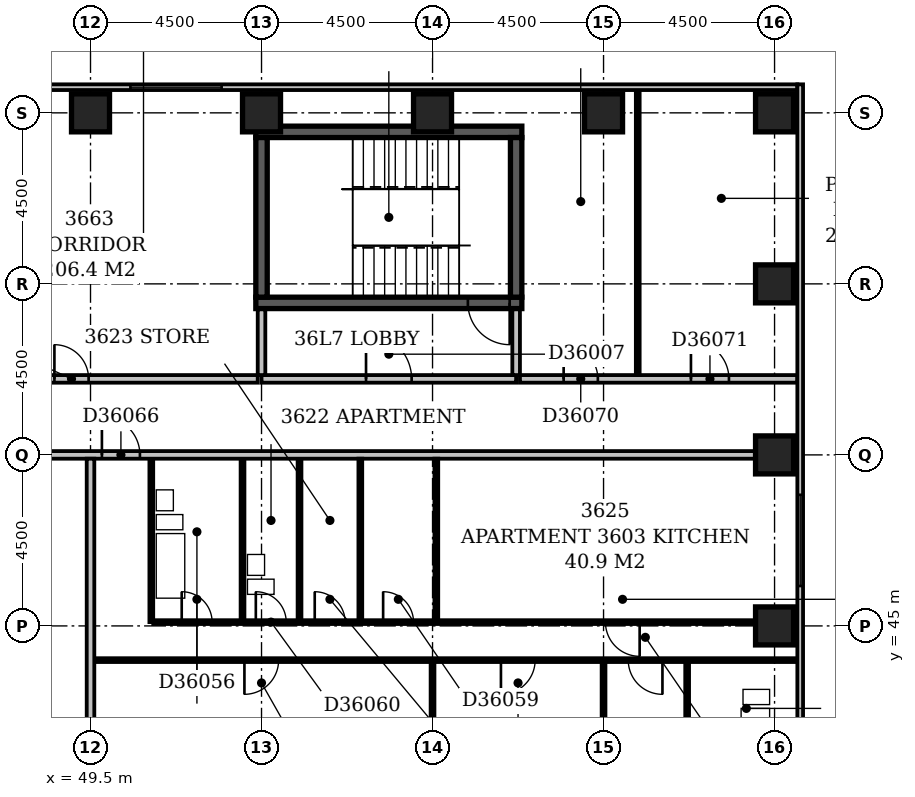
"""IFC4 building model, lengths in metres.
Left out: names, types, materials, properties, quantities, classifications, styles, units other than length and angle.
Written with IfcOpenShell. Run it as: python <this file> out.ifc"""

import sys

from ifc_helpers import new_model, si_unit, direction, frame, frame_2d, origin, origin_2d, place, context, subcontext, project, spatial, rectangle, extrude, element, fill, save


model = new_model("IFC4")
c1 = context("Model", 3, precision=1e-05, world=origin(), true_north=direction((0.0, 1.0)))
c2 = subcontext(c1, "Body", "Model", "MODEL_VIEW")
j1 = project(units=[si_unit("LENGTHUNIT", "METRE"), si_unit("PLANEANGLEUNIT", "RADIAN")], contexts=[c1])
p1 = place(None, origin())
s1 = spatial("IfcSite", under=j1, at=p1, CompositionType="ELEMENT")
p2 = place(p1, origin())
s2 = spatial("IfcBuilding", under=s1, at=p2, CompositionType="ELEMENT")
p3 = place(p2, frame((0.0, 0.0, 144.8)))
s3 = spatial("IfcBuildingStorey", under=s2, at=p3, CompositionType="ELEMENT", Elevation=144.8)
p4 = place(p3, frame((53.85, 53.5, -0.3), z_axis=(0.0, 0.0, 1.0), x_axis=(1.0, 0.0, 0.0)))
e1 = element("IfcWall", 1, at=p4, inside=s3, PredefinedType="SHEAR", context=c2, shape_type="SweptSolid", body=[
    extrude(rectangle(XDim=7.0, YDim=0.3, at=frame_2d((3.5, 0.0))), origin(), (0.0, 0.0, 1.0), 3.6),
])
p5 = place(p4, frame((5.58, 0.0, 0.3)))
e2 = element("IfcOpeningElement", 2, at=p5, cuts=e1, PredefinedType="OPENING", context=c2, shape_type="SweptSolid", body=[
    extrude(rectangle(XDim=1.1, YDim=2.1, at=frame_2d((0.55, 1.05))), frame((0.0, 0.162, 0.0), z_axis=(0.0, -1.0, 0.0), x_axis=(1.0, 0.0, 0.0)), (0.0, 0.0, 1.0), 0.324),
])
p6 = place(p3, frame((53.85, 58.0, -0.3), z_axis=(0.0, 0.0, 1.0), x_axis=(1.0, 0.0, 0.0)))
e3 = element("IfcWall", 3, at=p6, inside=s3, PredefinedType="SHEAR", context=c2, shape_type="SweptSolid", body=[
    extrude(rectangle(XDim=7.0, YDim=0.3, at=frame_2d((3.5, 0.0))), origin(), (0.0, 0.0, 1.0), 3.6),
])
for number, where, z_axis, x_axis in (
    (4, (54.0, 53.65, -0.3), (0.0, 0.0, 1.0), (0.0, 1.0, 0.0)),
    (5, (60.7, 53.65, -0.3), (0.0, 0.0, 1.0), (0.0, 1.0, 0.0)),
):
    element("IfcWall", number, at=place(p3, frame(where, z_axis=z_axis, x_axis=x_axis)), inside=s3, PredefinedType="SHEAR", context=c2, shape_type="SweptSolid", body=[
        extrude(rectangle(XDim=4.2, YDim=0.3, at=frame_2d((2.1, 0.0))), origin(), (0.0, 0.0, 1.0), 3.6),
    ])
for number, where, z_axis, x_axis in (
    (6, (67.5, 45.0, -0.3), (0.0, 0.0, 1.0), (1.0, 0.0, 0.0)),
    (7, (67.5, 49.5, -0.3), (0.0, 0.0, 1.0), (1.0, 0.0, 0.0)),
    (8, (67.5, 54.0, -0.3), (0.0, 0.0, 1.0), (1.0, 0.0, 0.0)),
    (9, (49.5, 58.5, -0.3), (0.0, 0.0, 1.0), (1.0, 0.0, 0.0)),
    (10, (54.0, 58.5, -0.3), (0.0, 0.0, 1.0), (1.0, 0.0, 0.0)),
    (11, (58.5, 58.5, -0.3), (0.0, 0.0, 1.0), (1.0, 0.0, 0.0)),
    (12, (63.0, 58.5, -0.3), (0.0, 0.0, 1.0), (1.0, 0.0, 0.0)),
    (13, (67.5, 58.5, -0.3), (0.0, 0.0, 1.0), (1.0, 0.0, 0.0)),
):
    element("IfcColumn", number, at=place(p3, frame(where, z_axis=z_axis, x_axis=x_axis)), inside=s3, PredefinedType="COLUMN", context=c2, shape_type="SweptSolid", body=[
        extrude(rectangle(XDim=1.0, YDim=1.0, at=origin_2d()), origin(), (0.0, 0.0, 1.0), 3.6),
    ])
p7 = place(p3, frame((68.175, 35.4, 0.0), z_axis=(0.0, 0.0, 1.0), x_axis=(0.0, 1.0, 0.0)))
e14 = element("IfcWall", 14, at=p7, inside=s3, PredefinedType="STANDARD", context=c2, shape_type="SweptSolid", body=[
    extrude(rectangle(XDim=23.85, YDim=0.15, at=frame_2d((11.925, 0.0))), origin(), (0.0, 0.0, 1.0), 2.7),
])
p8 = place(p7, frame((1.36, 0.0, 0.6)))
e15 = element("IfcOpeningElement", 15, at=p8, cuts=e14, PredefinedType="OPENING", context=c2, shape_type="SweptSolid", body=[
    extrude(rectangle(XDim=1.8, YDim=1.8, at=frame_2d((0.9, 0.9))), frame((0.0, 0.087, 0.0), z_axis=(0.0, -1.0, 0.0), x_axis=(1.0, 0.0, 0.0)), (0.0, 0.0, 1.0), 0.174),
])
p9 = place(p7, frame((10.65, 0.0, 0.6)))
e16 = element("IfcOpeningElement", 16, at=p9, cuts=e14, PredefinedType="OPENING", context=c2, shape_type="SweptSolid", body=[
    extrude(rectangle(XDim=2.4, YDim=1.8, at=frame_2d((1.2, 0.9))), frame((0.0, 0.087, 0.0), z_axis=(0.0, -1.0, 0.0), x_axis=(1.0, 0.0, 0.0)), (0.0, 0.0, 1.0), 0.174),
])
p10 = place(p3, frame((68.1, 59.175, 0.0), z_axis=(0.0, 0.0, 1.0), x_axis=(-1.0, 0.0, 0.0)))
e17 = element("IfcWall", 17, at=p10, inside=s3, PredefinedType="STANDARD", context=c2, shape_type="SweptSolid", body=[
    extrude(rectangle(XDim=68.85, YDim=0.15, at=frame_2d((34.425, 0.0))), origin(), (0.0, 0.0, 1.0), 2.7),
])
p11 = place(p10, frame((15.15, 0.0, 0.6)))
e18 = element("IfcOpeningElement", 18, at=p11, cuts=e17, PredefinedType="OPENING", context=c2, shape_type="SweptSolid", body=[
    extrude(rectangle(XDim=2.4, YDim=1.8, at=frame_2d((1.2, 0.9))), frame((0.0, 0.087, 0.0), z_axis=(0.0, -1.0, 0.0), x_axis=(1.0, 0.0, 0.0)), (0.0, 0.0, 1.0), 0.174),
])
p12 = place(p10, frame((19.65, 0.0, 0.6)))
e19 = element("IfcOpeningElement", 19, at=p12, cuts=e17, PredefinedType="OPENING", context=c2, shape_type="SweptSolid", body=[
    extrude(rectangle(XDim=2.4, YDim=1.8, at=frame_2d((1.2, 0.9))), frame((0.0, 0.087, 0.0), z_axis=(0.0, -1.0, 0.0), x_axis=(1.0, 0.0, 0.0)), (0.0, 0.0, 1.0), 0.174),
])
p13 = place(p10, frame((37.65, 0.0, 0.6)))
e20 = element("IfcOpeningElement", 20, at=p13, cuts=e17, PredefinedType="OPENING", context=c2, shape_type="SweptSolid", body=[
    extrude(rectangle(XDim=2.4, YDim=1.8, at=frame_2d((1.2, 0.9))), frame((0.0, 0.087, 0.0), z_axis=(0.0, -1.0, 0.0), x_axis=(1.0, 0.0, 0.0)), (0.0, 0.0, 1.0), 0.174),
])
p14 = place(p3, frame((54.0, 51.5, 0.0), z_axis=(0.0, 0.0, 1.0), x_axis=(1.0, 0.0, 0.0)))
e21 = element("IfcWall", 21, at=p14, inside=s3, PredefinedType="PARTITIONING", context=c2, shape_type="SweptSolid", body=[
    extrude(rectangle(XDim=6.7, YDim=0.2, at=frame_2d((3.35, 0.0))), origin(), (0.0, 0.0, 1.0), 3.3),
])
p15 = place(p14, frame((2.75, 0.0, 0.0)))
e22 = element("IfcOpeningElement", 22, at=p15, cuts=e21, PredefinedType="OPENING", context=c2, shape_type="SweptSolid", body=[
    extrude(rectangle(XDim=1.2, YDim=2.1, at=frame_2d((0.6, 1.05))), frame((0.0, 0.112, 0.0), z_axis=(0.0, -1.0, 0.0), x_axis=(1.0, 0.0, 0.0)), (0.0, 0.0, 1.0), 0.224),
])
p16 = place(p3, frame((60.7, 51.6, 0.0), z_axis=(0.0, 0.0, 1.0), x_axis=(0.0, 1.0, 0.0)))
e23 = element("IfcWall", 23, at=p16, inside=s3, PredefinedType="PARTITIONING", context=c2, shape_type="SweptSolid", body=[
    extrude(rectangle(XDim=1.73, YDim=0.2, at=frame_2d((0.865, 0.0))), origin(), (0.0, 0.0, 1.0), 3.3),
])
p17 = place(p3, frame((54.0, 51.6, 0.0), z_axis=(0.0, 0.0, 1.0), x_axis=(0.0, 1.0, 0.0)))
e24 = element("IfcWall", 24, at=p17, inside=s3, PredefinedType="PARTITIONING", context=c2, shape_type="SweptSolid", body=[
    extrude(rectangle(XDim=1.73, YDim=0.2, at=frame_2d((0.865, 0.0))), origin(), (0.0, 0.0, 1.0), 2.6),
])
p18 = place(p3, frame((49.5, 36.5, 0.0), z_axis=(0.0, 0.0, 1.0), x_axis=(0.0, 1.0, 0.0)))
e25 = element("IfcWall", 25, at=p18, inside=s3, PredefinedType="PARTITIONING", context=c2, shape_type="SweptSolid", body=[
    extrude(rectangle(XDim=12.9, YDim=0.2, at=frame_2d((6.45, 0.0))), origin(), (0.0, 0.0, 1.0), 3.3),
])
p19 = place(p3, frame((58.5, 36.5, 0.0), z_axis=(0.0, 0.0, 1.0), x_axis=(0.0, 1.0, 0.0)))
e26 = element("IfcWall", 26, at=p19, inside=s3, PredefinedType="PARTITIONING", context=c2, shape_type="SweptSolid", body=[
    extrude(rectangle(XDim=7.55, YDim=0.1, at=frame_2d((3.775, 0.0))), origin(), (0.0, 0.0, 1.0), 3.3),
])
p20 = place(p3, frame((63.0, 36.5, 0.0), z_axis=(0.0, 0.0, 1.0), x_axis=(0.0, 1.0, 0.0)))
e27 = element("IfcWall", 27, at=p20, inside=s3, PredefinedType="PARTITIONING", context=c2, shape_type="SweptSolid", body=[
    extrude(rectangle(XDim=7.55, YDim=0.1, at=frame_2d((3.775, 0.0))), origin(), (0.0, 0.0, 1.0), 2.4),
])
p21 = place(p3, frame((65.2, 40.7, 0.0), z_axis=(0.0, 0.0, 1.0), x_axis=(0.0, 1.0, 0.0)))
e28 = element("IfcWall", 28, at=p21, inside=s3, PredefinedType="PLUMBINGWALL", context=c2, shape_type="SweptSolid", body=[
    extrude(rectangle(XDim=3.35, YDim=0.1, at=frame_2d((1.675, 0.0))), origin(), (0.0, 0.0, 1.0), 3.3),
])
p22 = place(p21, frame((1.05, 0.0, 0.0)))
e29 = element("IfcOpeningElement", 29, at=p22, cuts=e28, PredefinedType="OPENING", context=c2, shape_type="SweptSolid", body=[
    extrude(rectangle(XDim=0.8, YDim=2.1, at=frame_2d((0.4, 1.05))), frame((0.0, 0.062, 0.0), z_axis=(0.0, -1.0, 0.0), x_axis=(1.0, 0.0, 0.0)), (0.0, 0.0, 1.0), 0.124),
])
p23 = place(p3, frame((49.6, 44.1, 0.0), z_axis=(0.0, 0.0, 1.0), x_axis=(1.0, 0.0, 0.0)))
e30 = element("IfcWall", 30, at=p23, inside=s3, PredefinedType="PARTITIONING", context=c2, shape_type="SweptSolid", body=[
    extrude(rectangle(XDim=18.5, YDim=0.1, at=frame_2d((9.25, 0.0))), origin(), (0.0, 0.0, 1.0), 3.3),
])
p24 = place(p23, frame((3.95, 0.0, 0.0)))
e31 = element("IfcOpeningElement", 31, at=p24, cuts=e30, PredefinedType="OPENING", context=c2, shape_type="SweptSolid", body=[
    extrude(rectangle(XDim=0.9, YDim=2.1, at=frame_2d((0.45, 1.05))), frame((0.0, 0.062, 0.0), z_axis=(0.0, -1.0, 0.0), x_axis=(1.0, 0.0, 0.0)), (0.0, 0.0, 1.0), 0.124),
])
p25 = place(p23, frame((10.7, 0.0, 0.0)))
e32 = element("IfcOpeningElement", 32, at=p25, cuts=e30, PredefinedType="OPENING", context=c2, shape_type="SweptSolid", body=[
    extrude(rectangle(XDim=0.9, YDim=2.1, at=frame_2d((0.45, 1.05))), frame((0.0, 0.062, 0.0), z_axis=(0.0, -1.0, 0.0), x_axis=(1.0, 0.0, 0.0)), (0.0, 0.0, 1.0), 0.124),
])
p26 = place(p23, frame((14.05, 0.0, 0.0)))
e33 = element("IfcOpeningElement", 33, at=p26, cuts=e30, PredefinedType="OPENING", context=c2, shape_type="SweptSolid", body=[
    extrude(rectangle(XDim=0.9, YDim=2.1, at=frame_2d((0.45, 1.05))), frame((0.0, 0.062, 0.0), z_axis=(0.0, -1.0, 0.0), x_axis=(1.0, 0.0, 0.0)), (0.0, 0.0, 1.0), 0.124),
])
p27 = place(p3, frame((51.1, 45.1, 0.0), z_axis=(0.0, 0.0, 1.0), x_axis=(0.0, 1.0, 0.0)))
e34 = element("IfcWall", 34, at=p27, inside=s3, PredefinedType="PLUMBINGWALL", context=c2, shape_type="SweptSolid", body=[
    extrude(rectangle(XDim=4.3, YDim=0.1, at=frame_2d((2.15, 0.0))), origin(), (0.0, 0.0, 1.0), 3.3),
])
p28 = place(p3, frame((51.15, 45.1, 0.0), z_axis=(0.0, 0.0, 1.0), x_axis=(1.0, 0.0, 0.0)))
e35 = element("IfcWall", 35, at=p28, inside=s3, PredefinedType="PARTITIONING", context=c2, shape_type="SweptSolid", body=[
    extrude(rectangle(XDim=15.85, YDim=0.1, at=frame_2d((7.925, 0.0))), origin(), (0.0, 0.0, 1.0), 3.3),
])
p29 = place(p28, frame((0.75, 0.0, 0.0)))
e36 = element("IfcOpeningElement", 36, at=p29, cuts=e35, PredefinedType="OPENING", context=c2, shape_type="SweptSolid", body=[
    extrude(rectangle(XDim=0.8, YDim=2.1, at=frame_2d((0.4, 1.05))), frame((0.0, 0.062, 0.0), z_axis=(0.0, -1.0, 0.0), x_axis=(1.0, 0.0, 0.0)), (0.0, 0.0, 1.0), 0.124),
])
p30 = place(p28, frame((11.9, 0.0, 0.0)))
e37 = element("IfcOpeningElement", 37, at=p30, cuts=e35, PredefinedType="OPENING", context=c2, shape_type="SweptSolid", body=[
    extrude(rectangle(XDim=0.9, YDim=2.1, at=frame_2d((0.45, 1.05))), frame((0.0, 0.062, 0.0), z_axis=(0.0, -1.0, 0.0), x_axis=(1.0, 0.0, 0.0)), (0.0, 0.0, 1.0), 0.124),
])
p31 = place(p28, frame((4.25, 0.0, 0.0)))
e38 = element("IfcOpeningElement", 38, at=p31, cuts=e35, PredefinedType="OPENING", context=c2, shape_type="SweptSolid", body=[
    extrude(rectangle(XDim=0.8, YDim=2.1, at=frame_2d((0.4, 1.05))), frame((0.0, 0.062, 0.0), z_axis=(0.0, -1.0, 0.0), x_axis=(1.0, 0.0, 0.0)), (0.0, 0.0, 1.0), 0.124),
])
p32 = place(p28, frame((6.05, 0.0, 0.0)))
e39 = element("IfcOpeningElement", 39, at=p32, cuts=e35, PredefinedType="OPENING", context=c2, shape_type="SweptSolid", body=[
    extrude(rectangle(XDim=0.8, YDim=2.1, at=frame_2d((0.4, 1.05))), frame((0.0, 0.062, 0.0), z_axis=(0.0, -1.0, 0.0), x_axis=(1.0, 0.0, 0.0)), (0.0, 0.0, 1.0), 0.124),
])
p33 = place(p28, frame((2.7, 0.0, 0.0)))
e40 = element("IfcOpeningElement", 40, at=p33, cuts=e35, PredefinedType="OPENING", context=c2, shape_type="SweptSolid", body=[
    extrude(rectangle(XDim=0.8, YDim=2.1, at=frame_2d((0.4, 1.05))), frame((0.0, 0.062, 0.0), z_axis=(0.0, -1.0, 0.0), x_axis=(1.0, 0.0, 0.0)), (0.0, 0.0, 1.0), 0.124),
])
p34 = place(p3, frame((53.5, 45.15, 0.0), z_axis=(0.0, 0.0, 1.0), x_axis=(0.0, 1.0, 0.0)))
e41 = element("IfcWall", 41, at=p34, inside=s3, PredefinedType="PLUMBINGWALL", context=c2, shape_type="SweptSolid", body=[
    extrude(rectangle(XDim=4.25, YDim=0.1, at=frame_2d((2.125, 0.0))), origin(), (0.0, 0.0, 1.0), 2.6),
])
p35 = place(p3, frame((55.0, 45.15, 0.0), z_axis=(0.0, 0.0, 1.0), x_axis=(0.0, 1.0, 0.0)))
e42 = element("IfcWall", 42, at=p35, inside=s3, PredefinedType="PLUMBINGWALL", context=c2, shape_type="SweptSolid", body=[
    extrude(rectangle(XDim=4.25, YDim=0.1, at=frame_2d((2.125, 0.0))), origin(), (0.0, 0.0, 1.0), 3.3),
])
for number, where, z_axis, x_axis in (
    (43, (56.6, 45.15, 0.0), (0.0, 0.0, 1.0), (0.0, 1.0, 0.0)),
    (44, (58.6, 45.15, 0.0), (0.0, 0.0, 1.0), (0.0, 1.0, 0.0)),
):
    element("IfcWall", number, at=place(p3, frame(where, z_axis=z_axis, x_axis=x_axis)), inside=s3, PredefinedType="PARTITIONING", context=c2, shape_type="SweptSolid", body=[
        extrude(rectangle(XDim=4.25, YDim=0.1, at=frame_2d((2.125, 0.0))), origin(), (0.0, 0.0, 1.0), 3.3),
    ])
p36 = place(p3, frame((48.35, 49.5, 0.0), z_axis=(0.0, 0.0, 1.0), x_axis=(1.0, 0.0, 0.0)))
e45 = element("IfcWall", 45, at=p36, inside=s3, PredefinedType="PARTITIONING", context=c2, shape_type="SweptSolid", body=[
    extrude(rectangle(XDim=18.65, YDim=0.2, at=frame_2d((9.325, 0.0))), origin(), (0.0, 0.0, 1.0), 3.3),
])
p37 = place(p36, frame((1.45, 0.0, 0.0)))
e46 = element("IfcOpeningElement", 46, at=p37, cuts=e45, PredefinedType="OPENING", context=c2, shape_type="SweptSolid", body=[
    extrude(rectangle(XDim=1.0, YDim=2.1, at=frame_2d((0.5, 1.05))), frame((0.0, 0.112, 0.0), z_axis=(0.0, -1.0, 0.0), x_axis=(1.0, 0.0, 0.0)), (0.0, 0.0, 1.0), 0.224),
])
p38 = place(p3, frame((44.1, 51.5, 0.0), z_axis=(0.0, 0.0, 1.0), x_axis=(1.0, 0.0, 0.0)))
e47 = element("IfcWall", 47, at=p38, inside=s3, PredefinedType="PARTITIONING", context=c2, shape_type="SweptSolid", body=[
    extrude(rectangle(XDim=9.8, YDim=0.2, at=frame_2d((4.9, 0.0))), origin(), (0.0, 0.0, 1.0), 3.3),
])
p39 = place(p38, frame((4.45, 0.0, 0.0)))
e48 = element("IfcOpeningElement", 48, at=p39, cuts=e47, PredefinedType="OPENING", context=c2, shape_type="SweptSolid", body=[
    extrude(rectangle(XDim=0.9, YDim=2.1, at=frame_2d((0.45, 1.05))), frame((0.0, 0.112, 0.0), z_axis=(0.0, -1.0, 0.0), x_axis=(1.0, 0.0, 0.0)), (0.0, 0.0, 1.0), 0.224),
])
p40 = place(p3, frame((60.8, 51.5, 0.0), z_axis=(0.0, 0.0, 1.0), x_axis=(1.0, 0.0, 0.0)))
e49 = element("IfcWall", 49, at=p40, inside=s3, PredefinedType="PARTITIONING", context=c2, shape_type="SweptSolid", body=[
    extrude(rectangle(XDim=7.3, YDim=0.2, at=frame_2d((3.65, 0.0))), origin(), (0.0, 0.0, 1.0), 3.3),
])
p41 = place(p40, frame((1.15, 0.0, 0.0)))
e50 = element("IfcOpeningElement", 50, at=p41, cuts=e49, PredefinedType="OPENING", context=c2, shape_type="SweptSolid", body=[
    extrude(rectangle(XDim=0.9, YDim=2.1, at=frame_2d((0.45, 1.05))), frame((0.0, 0.112, 0.0), z_axis=(0.0, -1.0, 0.0), x_axis=(1.0, 0.0, 0.0)), (0.0, 0.0, 1.0), 0.224),
])
p42 = place(p40, frame((4.5, 0.0, 0.0)))
e51 = element("IfcOpeningElement", 51, at=p42, cuts=e49, PredefinedType="OPENING", context=c2, shape_type="SweptSolid", body=[
    extrude(rectangle(XDim=1.0, YDim=2.1, at=frame_2d((0.5, 1.05))), frame((0.0, 0.112, 0.0), z_axis=(0.0, -1.0, 0.0), x_axis=(1.0, 0.0, 0.0)), (0.0, 0.0, 1.0), 0.224),
])
p43 = place(p3, frame((63.9, 51.6, 0.0), z_axis=(0.0, 0.0, 1.0), x_axis=(0.0, 1.0, 0.0)))
e52 = element("IfcWall", 52, at=p43, inside=s3, PredefinedType="PARTITIONING", context=c2, shape_type="SweptSolid", body=[
    extrude(rectangle(XDim=7.5, YDim=0.1, at=frame_2d((3.75, 0.0))), origin(), (0.0, 0.0, 1.0), 3.3),
])
p44 = place(p9, origin())
e53 = element("IfcWindow", 53, at=p44, inside=s3, PartitioningType="SINGLE_PANEL", PredefinedType="WINDOW", context=c2, shape_type="SweptSolid", body=[
    extrude(rectangle(XDim=2.4, YDim=1.8, at=frame_2d((1.2, 0.9))), frame((0.0, 0.03, 0.0), z_axis=(0.0, -1.0, 0.0), x_axis=(1.0, 0.0, 0.0)), (0.0, 0.0, 1.0), 0.06),
])
fill(e16, e53)
p45 = place(p11, origin())
e54 = element("IfcWindow", 54, at=p45, inside=s3, PartitioningType="SINGLE_PANEL", PredefinedType="WINDOW", context=c2, shape_type="SweptSolid", body=[
    extrude(rectangle(XDim=2.4, YDim=1.8, at=frame_2d((1.2, 0.9))), frame((0.0, 0.03, 0.0), z_axis=(0.0, -1.0, 0.0), x_axis=(1.0, 0.0, 0.0)), (0.0, 0.0, 1.0), 0.06),
])
fill(e18, e54)
p46 = place(p15, origin())
e55 = element("IfcDoor", 55, at=p46, inside=s3, OperationType="SINGLE_SWING_LEFT", PredefinedType="DOOR", context=c2, shape_type="SweptSolid", body=[
    extrude(rectangle(XDim=1.2, YDim=2.1, at=frame_2d((0.6, 1.05))), frame((0.0, 0.025, 0.0), z_axis=(0.0, -1.0, 0.0), x_axis=(1.0, 0.0, 0.0)), (0.0, 0.0, 1.0), 0.05),
])
fill(e22, e55)
p47 = place(p5, origin())
e56 = element("IfcDoor", 56, at=p47, inside=s3, OperationType="SINGLE_SWING_RIGHT", PredefinedType="DOOR", context=c2, shape_type="SweptSolid", body=[
    extrude(rectangle(XDim=1.1, YDim=2.1, at=frame_2d((0.55, 1.05))), frame((0.0, 0.025, 0.0), z_axis=(0.0, -1.0, 0.0), x_axis=(1.0, 0.0, 0.0)), (0.0, 0.0, 1.0), 0.05),
])
fill(e2, e56)
p48 = place(p24, frame((0.9, 0.0, 0.0), z_axis=(0.0, 0.0, 1.0), x_axis=(-1.0, 0.0, 0.0)))
e57 = element("IfcDoor", 57, at=p48, inside=s3, OperationType="SINGLE_SWING_RIGHT", PredefinedType="DOOR", context=c2, shape_type="SweptSolid", body=[
    extrude(rectangle(XDim=0.9, YDim=2.1, at=frame_2d((0.45, 1.05))), frame((0.0, 0.025, 0.0), z_axis=(0.0, -1.0, 0.0), x_axis=(1.0, 0.0, 0.0)), (0.0, 0.0, 1.0), 0.05),
])
fill(e31, e57)
p49 = place(p25, frame((0.9, 0.0, 0.0), z_axis=(0.0, 0.0, 1.0), x_axis=(-1.0, 0.0, 0.0)))
e58 = element("IfcDoor", 58, at=p49, inside=s3, OperationType="SINGLE_SWING_RIGHT", PredefinedType="DOOR", context=c2, shape_type="SweptSolid", body=[
    extrude(rectangle(XDim=0.9, YDim=2.1, at=frame_2d((0.45, 1.05))), frame((0.0, 0.025, 0.0), z_axis=(0.0, -1.0, 0.0), x_axis=(1.0, 0.0, 0.0)), (0.0, 0.0, 1.0), 0.05),
])
fill(e32, e58)
p50 = place(p26, origin())
e59 = element("IfcDoor", 59, at=p50, inside=s3, OperationType="SINGLE_SWING_RIGHT", PredefinedType="DOOR", context=c2, shape_type="SweptSolid", body=[
    extrude(rectangle(XDim=0.9, YDim=2.1, at=frame_2d((0.45, 1.05))), frame((0.0, 0.025, 0.0), z_axis=(0.0, -1.0, 0.0), x_axis=(1.0, 0.0, 0.0)), (0.0, 0.0, 1.0), 0.05),
])
fill(e33, e59)
p51 = place(p29, origin())
e60 = element("IfcDoor", 60, at=p51, inside=s3, OperationType="SINGLE_SWING_LEFT", PredefinedType="DOOR", context=c2, shape_type="SweptSolid", body=[
    extrude(rectangle(XDim=0.8, YDim=2.1, at=frame_2d((0.4, 1.05))), frame((0.0, 0.025, 0.0), z_axis=(0.0, -1.0, 0.0), x_axis=(1.0, 0.0, 0.0)), (0.0, 0.0, 1.0), 0.05),
])
fill(e36, e60)
p52 = place(p30, origin())
e61 = element("IfcDoor", 61, at=p52, inside=s3, OperationType="SINGLE_SWING_RIGHT", PredefinedType="DOOR", context=c2, shape_type="SweptSolid", body=[
    extrude(rectangle(XDim=0.9, YDim=2.1, at=frame_2d((0.45, 1.05))), frame((0.0, 0.025, 0.0), z_axis=(0.0, -1.0, 0.0), x_axis=(1.0, 0.0, 0.0)), (0.0, 0.0, 1.0), 0.05),
])
fill(e37, e61)
p53 = place(p31, origin())
e62 = element("IfcDoor", 62, at=p53, inside=s3, OperationType="SINGLE_SWING_LEFT", PredefinedType="DOOR", context=c2, shape_type="SweptSolid", body=[
    extrude(rectangle(XDim=0.8, YDim=2.1, at=frame_2d((0.4, 1.05))), frame((0.0, 0.025, 0.0), z_axis=(0.0, -1.0, 0.0), x_axis=(1.0, 0.0, 0.0)), (0.0, 0.0, 1.0), 0.05),
])
fill(e38, e62)
p54 = place(p32, origin())
e63 = element("IfcDoor", 63, at=p54, inside=s3, OperationType="SINGLE_SWING_LEFT", PredefinedType="DOOR", context=c2, shape_type="SweptSolid", body=[
    extrude(rectangle(XDim=0.8, YDim=2.1, at=frame_2d((0.4, 1.05))), frame((0.0, 0.025, 0.0), z_axis=(0.0, -1.0, 0.0), x_axis=(1.0, 0.0, 0.0)), (0.0, 0.0, 1.0), 0.05),
])
fill(e39, e63)
p55 = place(p33, origin())
e64 = element("IfcDoor", 64, at=p55, inside=s3, OperationType="SINGLE_SWING_LEFT", PredefinedType="DOOR", context=c2, shape_type="SweptSolid", body=[
    extrude(rectangle(XDim=0.8, YDim=2.1, at=frame_2d((0.4, 1.05))), frame((0.0, 0.025, 0.0), z_axis=(0.0, -1.0, 0.0), x_axis=(1.0, 0.0, 0.0)), (0.0, 0.0, 1.0), 0.05),
])
fill(e40, e64)
p56 = place(p37, origin())
e65 = element("IfcDoor", 65, at=p56, inside=s3, OperationType="SINGLE_SWING_LEFT", PredefinedType="DOOR", context=c2, shape_type="SweptSolid", body=[
    extrude(rectangle(XDim=1.0, YDim=2.1, at=frame_2d((0.5, 1.05))), frame((0.0, 0.025, 0.0), z_axis=(0.0, -1.0, 0.0), x_axis=(1.0, 0.0, 0.0)), (0.0, 0.0, 1.0), 0.05),
])
fill(e46, e65)
p57 = place(p39, origin())
e66 = element("IfcDoor", 66, at=p57, inside=s3, OperationType="SINGLE_SWING_LEFT", PredefinedType="DOOR", context=c2, shape_type="SweptSolid", body=[
    extrude(rectangle(XDim=0.9, YDim=2.1, at=frame_2d((0.45, 1.05))), frame((0.0, 0.025, 0.0), z_axis=(0.0, -1.0, 0.0), x_axis=(1.0, 0.0, 0.0)), (0.0, 0.0, 1.0), 0.05),
])
fill(e48, e66)
p58 = place(p41, origin())
e67 = element("IfcDoor", 67, at=p58, inside=s3, OperationType="SINGLE_SWING_LEFT", PredefinedType="DOOR", context=c2, shape_type="SweptSolid", body=[
    extrude(rectangle(XDim=0.9, YDim=2.1, at=frame_2d((0.45, 1.05))), frame((0.0, 0.025, 0.0), z_axis=(0.0, -1.0, 0.0), x_axis=(1.0, 0.0, 0.0)), (0.0, 0.0, 1.0), 0.05),
])
fill(e50, e67)
p59 = place(p42, origin())
e68 = element("IfcDoor", 68, at=p59, inside=s3, OperationType="SINGLE_SWING_LEFT", PredefinedType="DOOR", context=c2, shape_type="SweptSolid", body=[
    extrude(rectangle(XDim=1.0, YDim=2.1, at=frame_2d((0.5, 1.05))), frame((0.0, 0.025, 0.0), z_axis=(0.0, -1.0, 0.0), x_axis=(1.0, 0.0, 0.0)), (0.0, 0.0, 1.0), 0.05),
])
fill(e51, e68)
save(model, sys.argv[1])
